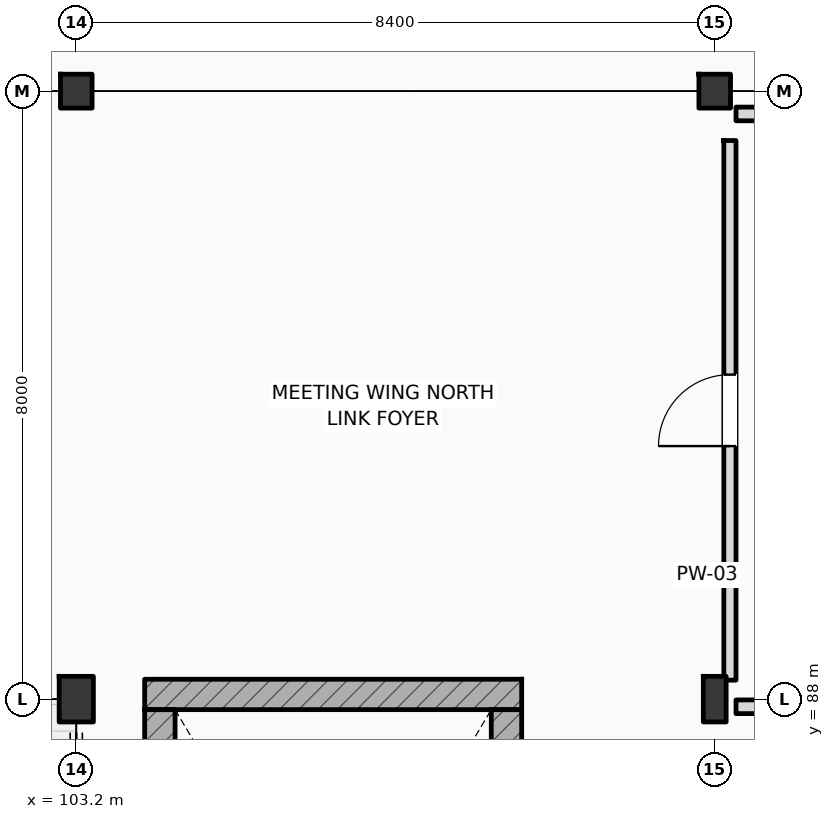
"""IFC4 building model, lengths in metres.
Left out: names, types, materials, properties, quantities, classifications, styles, units other than length and angle.
Written with IfcOpenShell. Run it as: python <this file> out.ifc"""

import sys

from ifc_helpers import new_model, si_unit, direction, frame, frame_2d, origin, origin_2d, place, context, subcontext, project, spatial, rectangle, i_section, extrude, element, fill, save


model = new_model("IFC4")
c1 = context("Model", 3, precision=1e-05, world=origin(), true_north=direction((0.0, 1.0)))
c2 = subcontext(c1, "Body", "Model", "MODEL_VIEW")
j1 = project(units=[si_unit("LENGTHUNIT", "METRE"), si_unit("PLANEANGLEUNIT", "RADIAN")], contexts=[c1])
p1 = place(None, origin())
s1 = spatial("IfcSite", under=j1, at=p1, CompositionType="ELEMENT")
p2 = place(p1, origin())
s2 = spatial("IfcBuilding", under=s1, at=p2, CompositionType="ELEMENT")
p3 = place(p2, origin())
s3 = spatial("IfcBuildingStorey", under=s2, at=p3, CompositionType="ELEMENT", Elevation=0.0)
for number, where, z_axis, x_axis in (
    (1, (103.2, 96.0, 0.0), (0.0, 0.0, 1.0), (1.0, 0.0, 0.0)),
    (2, (111.6, 96.0, 0.0), (0.0, 0.0, 1.0), (1.0, 0.0, 0.0)),
):
    element("IfcColumn", number, at=place(p3, frame(where, z_axis=z_axis, x_axis=x_axis)), inside=s3, PredefinedType="COLUMN", context=c2, shape_type="SweptSolid", body=[
        extrude(i_section(OverallWidth=0.416, OverallDepth=0.446, WebThickness=0.036, FlangeThickness=0.048, FilletRadius=0.015, at=origin_2d()), origin(), (0.0, 0.0, 1.0), 6.0),
    ])
p4 = place(p3, frame((103.2, 88.0, 0.0), z_axis=(0.0, 0.0, 1.0), x_axis=(1.0, 0.0, 0.0)))
e3 = element("IfcColumn", 3, at=p4, inside=s3, PredefinedType="PILASTER", context=c2, shape_type="SweptSolid", body=[
    extrude(rectangle(XDim=0.45, YDim=0.6, at=origin_2d()), origin(), (0.0, 0.0, 1.0), 6.0),
])
p5 = place(p3, frame((111.6, 88.0, 0.0), z_axis=(0.0, 0.0, 1.0), x_axis=(1.0, 0.0, 0.0)))
e4 = element("IfcColumn", 4, at=p5, inside=s3, PredefinedType="COLUMN", context=c2, shape_type="SweptSolid", body=[
    extrude(i_section(OverallWidth=0.3, OverallDepth=0.6, WebThickness=0.015, FlangeThickness=0.03, FilletRadius=0.027, at=origin_2d()), origin(), (0.0, 0.0, 1.0), 6.0),
])
p6 = place(p3, frame((104.1, 88.062, 0.0), z_axis=(0.0, 0.0, 1.0), x_axis=(1.0, 0.0, 0.0)))
e5 = element("IfcWall", 5, at=p6, inside=s3, PredefinedType="SHEAR", context=c2, shape_type="SweptSolid", body=[
    extrude(rectangle(XDim=4.96, YDim=0.4, at=frame_2d((2.48, 0.0))), origin(), (0.0, 0.0, 1.0), 6.0),
])
p7 = place(p3, frame((104.3, 78.75, 0.0), z_axis=(0.0, 0.0, 1.0), x_axis=(0.0, 1.0, 0.0)))
e6 = element("IfcWall", 6, at=p7, inside=s3, PredefinedType="SHEAR", context=c2, shape_type="SweptSolid", body=[
    extrude(rectangle(XDim=9.112, YDim=0.4, at=frame_2d((4.556, 0.0))), origin(), (0.0, 0.0, 1.0), 6.0),
])
p8 = place(p3, frame((108.86, 78.75, 0.0), z_axis=(0.0, 0.0, 1.0), x_axis=(0.0, 1.0, 0.0)))
e7 = element("IfcWall", 7, at=p8, inside=s3, PredefinedType="SHEAR", context=c2, shape_type="SweptSolid", body=[
    extrude(rectangle(XDim=9.112, YDim=0.4, at=frame_2d((4.556, 0.0))), origin(), (0.0, 0.0, 1.0), 6.0),
])
p9 = place(p8, frame((0.44, 0.0, 0.0)))
e8 = element("IfcOpeningElement", 8, at=p9, cuts=e7, PredefinedType="OPENING", context=c2, shape_type="SweptSolid", body=[
    extrude(rectangle(XDim=1.1, YDim=2.2, at=frame_2d((0.55, 1.1))), frame((0.0, 0.21, 0.0), z_axis=(0.0, -1.0, 0.0), x_axis=(1.0, 0.0, 0.0)), (0.0, 0.0, 1.0), 0.42),
])
p10 = place(p3, frame((111.8, 88.25, 0.0), z_axis=(0.0, 0.0, 1.0), x_axis=(0.0, 1.0, 0.0)))
e9 = element("IfcWall", 9, at=p10, inside=s3, PredefinedType="PARTITIONING", context=c2, shape_type="SweptSolid", body=[
    extrude(rectangle(XDim=7.1, YDim=0.16, at=frame_2d((3.55, 0.0))), origin(), (0.0, 0.0, 1.0), 5.24),
])
p11 = place(p10, frame((3.08, 0.0, 0.0)))
e10 = element("IfcOpeningElement", 10, at=p11, cuts=e9, PredefinedType="OPENING", context=c2, shape_type="SweptSolid", body=[
    extrude(rectangle(XDim=0.94, YDim=2.15, at=frame_2d((0.47, 1.075))), frame((0.0, 0.09, 0.0), z_axis=(0.0, -1.0, 0.0), x_axis=(1.0, 0.0, 0.0)), (0.0, 0.0, 1.0), 0.18),
])
p12 = place(p3, frame((111.88, 87.9, 0.0), z_axis=(0.0, 0.0, 1.0), x_axis=(1.0, 0.0, 0.0)))
e11 = element("IfcWall", 11, at=p12, inside=s3, PredefinedType="PARTITIONING", context=c2, shape_type="SweptSolid", body=[
    extrude(rectangle(XDim=3.53, YDim=0.18, at=frame_2d((1.765, 0.0))), origin(), (0.0, 0.0, 1.0), 5.14),
])
p13 = place(p3, frame((111.88, 95.7, 0.0), z_axis=(0.0, 0.0, 1.0), x_axis=(1.0, 0.0, 0.0)))
e12 = element("IfcWall", 12, at=p13, inside=s3, PredefinedType="PARTITIONING", context=c2, shape_type="SweptSolid", body=[
    extrude(rectangle(XDim=3.53, YDim=0.18, at=frame_2d((1.765, 0.0))), origin(), (0.0, 0.0, 1.0), 5.7),
])
p14 = place(p11, origin())
e13 = element("IfcDoor", 13, at=p14, inside=s3, OperationType="SINGLE_SWING_LEFT", PredefinedType="DOOR", context=c2, shape_type="SweptSolid", body=[
    extrude(rectangle(XDim=0.94, YDim=2.15, at=frame_2d((0.47, 1.075))), frame((0.0, 0.025, 0.0), z_axis=(0.0, -1.0, 0.0), x_axis=(1.0, 0.0, 0.0)), (0.0, 0.0, 1.0), 0.05),
])
fill(e10, e13)
save(model, sys.argv[1])
